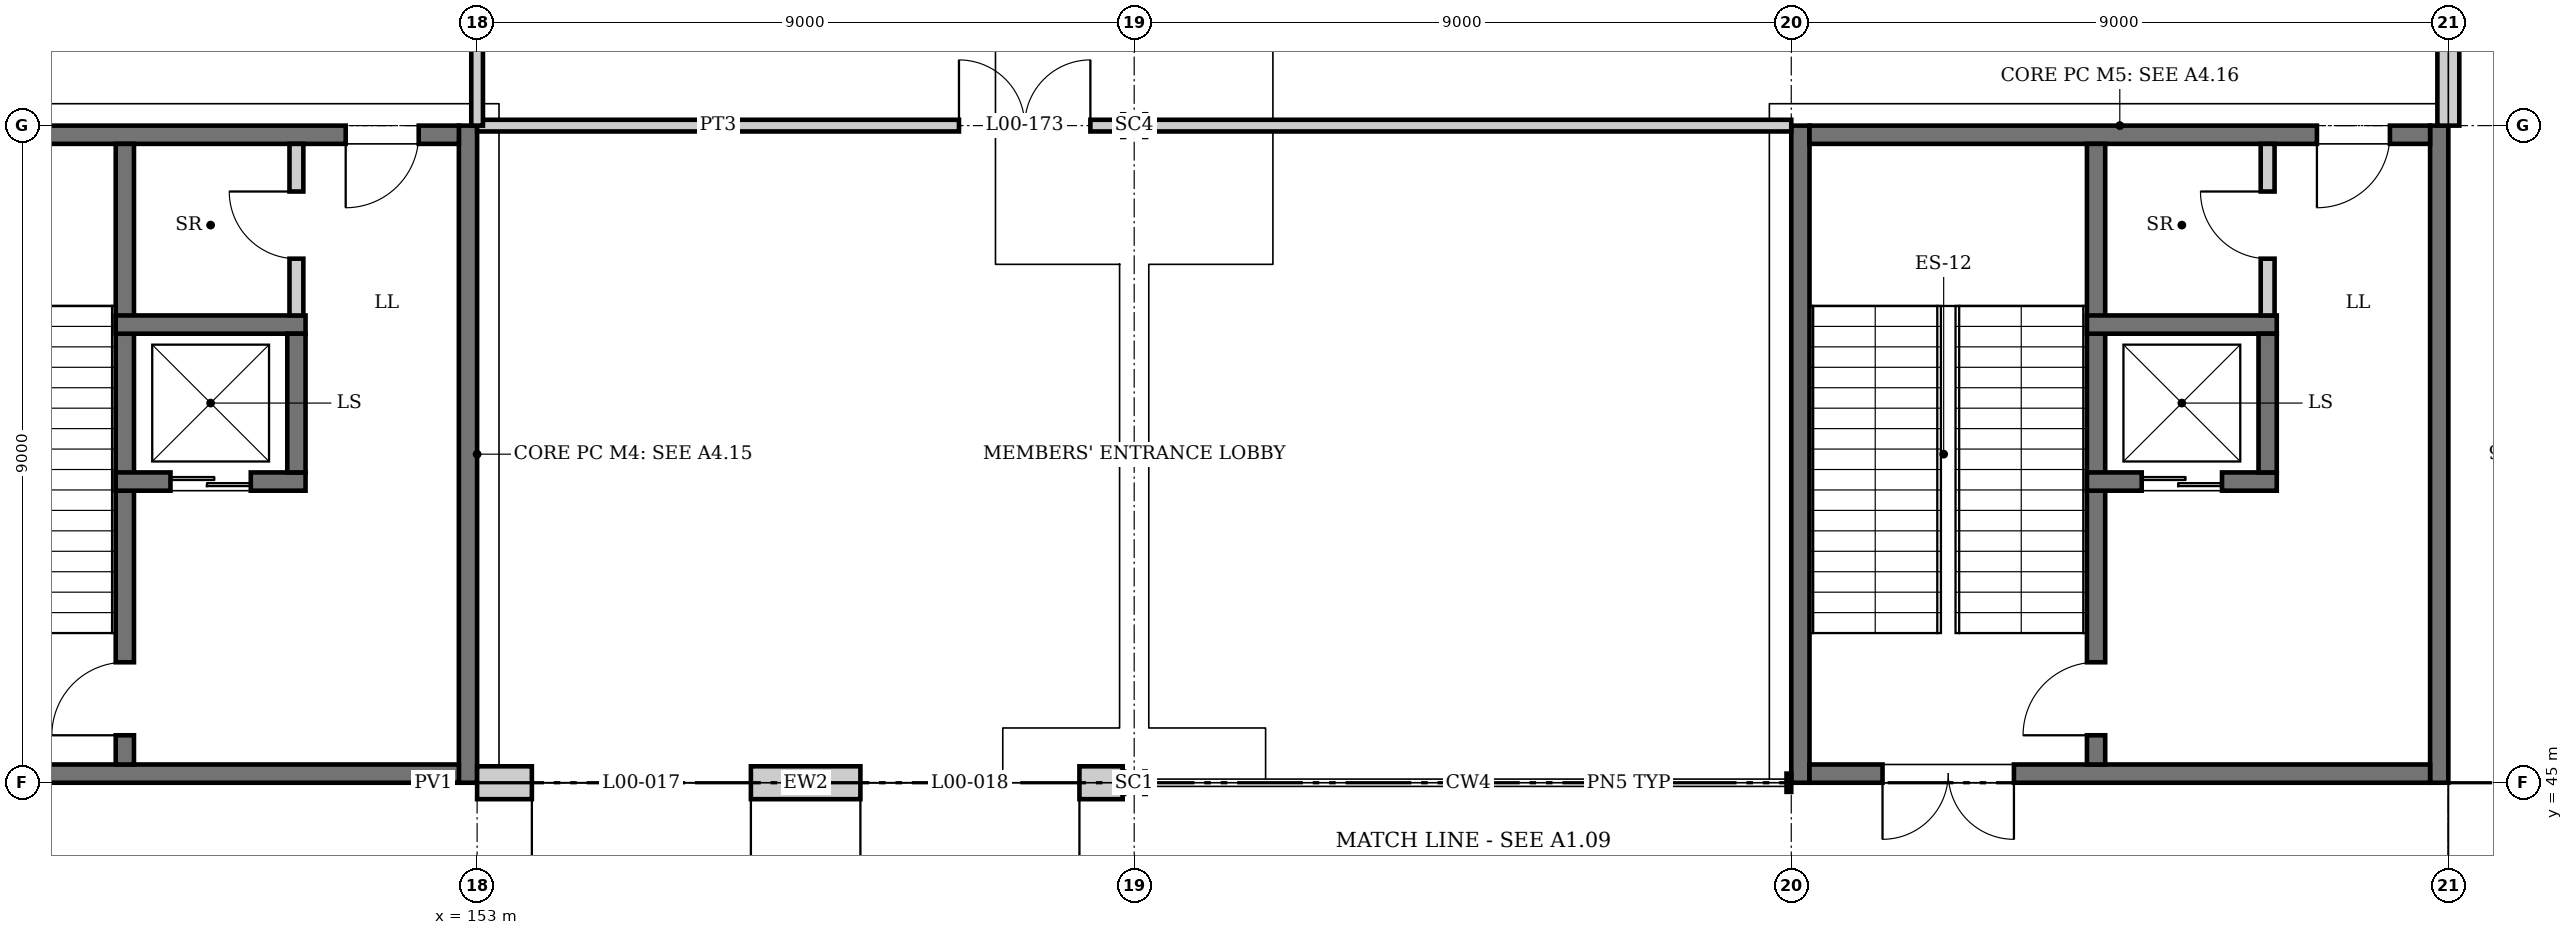
"""IFC4 building model, lengths in metres.
Left out: names, types, materials, properties, quantities, classifications, styles, units other than length and angle.
Written with IfcOpenShell. Run it as: python <this file> out.ifc"""

import sys

from ifc_helpers import new_model, si_unit, direction, frame, frame_2d, origin, origin_2d, place, context, subcontext, project, spatial, rectangle, i_section, extrude, element, fill, save


model = new_model("IFC4")
c1 = context("Model", 3, precision=1e-05, world=origin(), true_north=direction((0.0, 1.0)))
c2 = subcontext(c1, "Body", "Model", "MODEL_VIEW")
j1 = project(units=[si_unit("LENGTHUNIT", "METRE"), si_unit("PLANEANGLEUNIT", "RADIAN")], contexts=[c1])
p1 = place(None, origin())
s1 = spatial("IfcSite", under=j1, at=p1, CompositionType="ELEMENT")
p2 = place(p1, origin())
s2 = spatial("IfcBuilding", under=s1, at=p2, CompositionType="ELEMENT")
p3 = place(p2, origin())
s3 = spatial("IfcBuildingStorey", under=s2, at=p3, CompositionType="ELEMENT", Elevation=0.0)
p4 = place(p3, frame((162.0, 45.0, 0.0), z_axis=(0.0, 0.0, 1.0), x_axis=(0.0, 1.0, 0.0)))
e1 = element("IfcColumn", 1, at=p4, inside=s3, PredefinedType="COLUMN", context=c2, shape_type="SweptSolid", body=[
    extrude(i_section(OverallWidth=0.307, OverallDepth=0.315, WebThickness=0.012, FlangeThickness=0.019, at=origin_2d()), origin(), (0.0, 0.0, 1.0), 6.0),
])
p5 = place(p3, frame((162.0, 54.0, 0.0), z_axis=(0.0, 0.0, 1.0), x_axis=(0.0, 1.0, 0.0)))
e2 = element("IfcColumn", 2, at=p5, inside=s3, PredefinedType="COLUMN", context=c2, shape_type="SweptSolid", body=[
    extrude(i_section(OverallWidth=0.311, OverallDepth=0.327, WebThickness=0.016, FlangeThickness=0.025, at=origin_2d()), origin(), (0.0, 0.0, 1.0), 6.0),
])
p6 = place(p3, frame((152.875, 45.0, 0.0), z_axis=(0.0, 0.0, 1.0), x_axis=(0.0, 1.0, 0.0)))
e3 = element("IfcWall", 3, at=p6, inside=s3, PredefinedType="SHEAR", context=c2, shape_type="SweptSolid", body=[
    extrude(rectangle(XDim=9.0, YDim=0.25, at=frame_2d((4.5, 0.0))), origin(), (0.0, 0.0, 1.0), 6.0),
])
p7 = place(p3, frame((144.25, 45.125, 0.0), z_axis=(0.0, 0.0, 1.0), x_axis=(1.0, 0.0, 0.0)))
e4 = element("IfcWall", 4, at=p7, inside=s3, PredefinedType="SHEAR", context=c2, shape_type="SweptSolid", body=[
    extrude(rectangle(XDim=8.5, YDim=0.25, at=frame_2d((4.25, 0.0))), origin(), (0.0, 0.0, 1.0), 6.0),
])
p8 = place(p7, frame((1.0, 0.0, 0.0)))
e5 = element("IfcOpeningElement", 5, at=p8, cuts=e4, PredefinedType="OPENING", context=c2, shape_type="SweptSolid", body=[
    extrude(rectangle(XDim=1.8, YDim=2.4, at=frame_2d((0.9, 1.2))), frame((0.0, 0.135, 0.0), z_axis=(0.0, -1.0, 0.0), x_axis=(1.0, 0.0, 0.0)), (0.0, 0.0, 1.0), 0.27),
])
p9 = place(p3, frame((144.25, 53.875, 0.0), z_axis=(0.0, 0.0, 1.0), x_axis=(1.0, 0.0, 0.0)))
e6 = element("IfcWall", 6, at=p9, inside=s3, PredefinedType="SHEAR", context=c2, shape_type="SweptSolid", body=[
    extrude(rectangle(XDim=8.5, YDim=0.25, at=frame_2d((4.25, 0.0))), origin(), (0.0, 0.0, 1.0), 6.0),
])
p10 = place(p9, frame((6.95, 0.0, 0.0)))
e7 = element("IfcOpeningElement", 7, at=p10, cuts=e6, PredefinedType="OPENING", context=c2, shape_type="SweptSolid", body=[
    extrude(rectangle(XDim=1.0, YDim=2.1, at=frame_2d((0.5, 1.05))), frame((0.0, 0.135, 0.0), z_axis=(0.0, -1.0, 0.0), x_axis=(1.0, 0.0, 0.0)), (0.0, 0.0, 1.0), 0.27),
])
for number, where, z_axis, x_axis in (
    (8, (171.125, 45.0, 0.0), (0.0, 0.0, 1.0), (0.0, 1.0, 0.0)),
    (9, (179.875, 45.0, 0.0), (0.0, 0.0, 1.0), (0.0, 1.0, 0.0)),
):
    element("IfcWall", number, at=place(p3, frame(where, z_axis=z_axis, x_axis=x_axis)), inside=s3, PredefinedType="SHEAR", context=c2, shape_type="SweptSolid", body=[
        extrude(rectangle(XDim=9.0, YDim=0.25, at=frame_2d((4.5, 0.0))), origin(), (0.0, 0.0, 1.0), 6.0),
    ])
p11 = place(p3, frame((171.25, 45.125, 0.0), z_axis=(0.0, 0.0, 1.0), x_axis=(1.0, 0.0, 0.0)))
e10 = element("IfcWall", 10, at=p11, inside=s3, PredefinedType="SHEAR", context=c2, shape_type="SweptSolid", body=[
    extrude(rectangle(XDim=8.5, YDim=0.25, at=frame_2d((4.25, 0.0))), origin(), (0.0, 0.0, 1.0), 6.0),
])
p12 = place(p11, frame((1.0, 0.0, 0.0)))
e11 = element("IfcOpeningElement", 11, at=p12, cuts=e10, PredefinedType="OPENING", context=c2, shape_type="SweptSolid", body=[
    extrude(rectangle(XDim=1.8, YDim=2.4, at=frame_2d((0.9, 1.2))), frame((0.0, 0.135, 0.0), z_axis=(0.0, -1.0, 0.0), x_axis=(1.0, 0.0, 0.0)), (0.0, 0.0, 1.0), 0.27),
])
p13 = place(p3, frame((171.25, 53.875, 0.0), z_axis=(0.0, 0.0, 1.0), x_axis=(1.0, 0.0, 0.0)))
e12 = element("IfcWall", 12, at=p13, inside=s3, PredefinedType="SHEAR", context=c2, shape_type="SweptSolid", body=[
    extrude(rectangle(XDim=8.5, YDim=0.25, at=frame_2d((4.25, 0.0))), origin(), (0.0, 0.0, 1.0), 6.0),
])
p14 = place(p13, frame((6.95, 0.0, 0.0)))
e13 = element("IfcOpeningElement", 13, at=p14, cuts=e12, PredefinedType="OPENING", context=c2, shape_type="SweptSolid", body=[
    extrude(rectangle(XDim=1.0, YDim=2.1, at=frame_2d((0.5, 1.05))), frame((0.0, 0.135, 0.0), z_axis=(0.0, -1.0, 0.0), x_axis=(1.0, 0.0, 0.0)), (0.0, 0.0, 1.0), 0.27),
])
p15 = place(p3, frame((153.0, 45.0, 0.0), z_axis=(0.0, 0.0, 1.0), x_axis=(1.0, 0.0, 0.0)))
e14 = element("IfcWall", 14, at=p15, inside=s3, PredefinedType="SOLIDWALL", context=c2, shape_type="SweptSolid", body=[
    extrude(rectangle(XDim=8.843, YDim=0.45, at=frame_2d((4.421, 0.0))), origin(), (0.0, 0.0, 1.0), 5.444),
])
p16 = place(p15, frame((0.75, 0.0, 0.0)))
e15 = element("IfcOpeningElement", 15, at=p16, cuts=e14, PredefinedType="OPENING", context=c2, shape_type="SweptSolid", body=[
    extrude(rectangle(XDim=3.0, YDim=3.0, at=frame_2d((1.5, 1.5))), frame((0.0, 0.235, 0.0), z_axis=(0.0, -1.0, 0.0), x_axis=(1.0, 0.0, 0.0)), (0.0, 0.0, 1.0), 0.47),
])
p17 = place(p15, frame((5.25, 0.0, 0.0)))
e16 = element("IfcOpeningElement", 16, at=p17, cuts=e14, PredefinedType="OPENING", context=c2, shape_type="SweptSolid", body=[
    extrude(rectangle(XDim=3.0, YDim=3.0, at=frame_2d((1.5, 1.5))), frame((0.0, 0.235, 0.0), z_axis=(0.0, -1.0, 0.0), x_axis=(1.0, 0.0, 0.0)), (0.0, 0.0, 1.0), 0.47),
])
p18 = place(p3, frame((180.0, 54.0, 0.0), z_axis=(0.0, 0.0, 1.0), x_axis=(0.0, 1.0, 0.0)))
e17 = element("IfcWall", 17, at=p18, inside=s3, PredefinedType="SOLIDWALL", context=c2, shape_type="SweptSolid", body=[
    extrude(rectangle(XDim=8.846, YDim=0.3, at=frame_2d((4.423, 0.0))), origin(), (0.0, 0.0, 1.0), 5.444),
])
p19 = place(p18, frame((1.8, 0.0, 0.6)))
e18 = element("IfcOpeningElement", 18, at=p19, cuts=e17, PredefinedType="OPENING", context=c2, shape_type="SweptSolid", body=[
    extrude(rectangle(XDim=0.9, YDim=2.7, at=frame_2d((0.45, 1.35))), frame((0.0, 0.16, 0.0), z_axis=(0.0, -1.0, 0.0), x_axis=(1.0, 0.0, 0.0)), (0.0, 0.0, 1.0), 0.32),
])
p20 = place(p18, frame((5.7, 0.0, 1.2)))
e19 = element("IfcOpeningElement", 19, at=p20, cuts=e17, PredefinedType="OPENING", context=c2, shape_type="SweptSolid", body=[
    extrude(rectangle(XDim=2.1, YDim=1.2, at=frame_2d((1.05, 0.6))), frame((0.0, 0.16, 0.0), z_axis=(0.0, -1.0, 0.0), x_axis=(1.0, 0.0, 0.0)), (0.0, 0.0, 1.0), 0.32),
])
p21 = place(p3, frame((148.175, 45.25, 0.0), z_axis=(0.0, 0.0, 1.0), x_axis=(0.0, 1.0, 0.0)))
e20 = element("IfcWall", 20, at=p21, inside=s3, PredefinedType="SOLIDWALL", context=c2, shape_type="SweptSolid", body=[
    extrude(rectangle(XDim=8.5, YDim=0.25, at=frame_2d((4.25, 0.0))), origin(), (0.0, 0.0, 1.0), 5.75),
])
p22 = place(p21, frame((0.4, 0.0, 0.0)))
e21 = element("IfcOpeningElement", 21, at=p22, cuts=e20, PredefinedType="OPENING", context=c2, shape_type="SweptSolid", body=[
    extrude(rectangle(XDim=1.0, YDim=2.1, at=frame_2d((0.5, 1.05))), frame((0.0, 0.135, 0.0), z_axis=(0.0, -1.0, 0.0), x_axis=(1.0, 0.0, 0.0)), (0.0, 0.0, 1.0), 0.27),
])
p23 = place(p3, frame((148.05, 49.125, -1.4), z_axis=(0.0, 0.0, 1.0), x_axis=(1.0, 0.0, 0.0)))
e22 = element("IfcWall", 22, at=p23, inside=s3, PredefinedType="SOLIDWALL", context=c2, shape_type="SweptSolid", body=[
    extrude(rectangle(XDim=2.6, YDim=0.25, at=frame_2d((1.3, 0.0))), origin(), (0.0, 0.0, 1.0), 7.4),
])
p24 = place(p23, frame((0.75, 0.0, 1.4)))
e23 = element("IfcOpeningElement", 23, at=p24, cuts=e22, PredefinedType="OPENING", context=c2, shape_type="SweptSolid", body=[
    extrude(rectangle(XDim=1.1, YDim=2.1, at=frame_2d((0.55, 1.05))), frame((0.0, 0.135, 0.0), z_axis=(0.0, -1.0, 0.0), x_axis=(1.0, 0.0, 0.0)), (0.0, 0.0, 1.0), 0.27),
])
p25 = place(p3, frame((148.05, 51.275, -1.4), z_axis=(0.0, 0.0, 1.0), x_axis=(1.0, 0.0, 0.0)))
e24 = element("IfcWall", 24, at=p25, inside=s3, PredefinedType="SOLIDWALL", context=c2, shape_type="SweptSolid", body=[
    extrude(rectangle(XDim=2.6, YDim=0.25, at=frame_2d((1.3, 0.0))), origin(), (0.0, 0.0, 1.0), 7.4),
])
p26 = place(p3, frame((150.525, 49.25, -1.4), z_axis=(0.0, 0.0, 1.0), x_axis=(0.0, 1.0, 0.0)))
e25 = element("IfcWall", 25, at=p26, inside=s3, PredefinedType="SOLIDWALL", context=c2, shape_type="SweptSolid", body=[
    extrude(rectangle(XDim=1.9, YDim=0.25, at=frame_2d((0.95, 0.0))), origin(), (0.0, 0.0, 1.0), 7.4),
])
p27 = place(p3, frame((175.175, 45.25, 0.0), z_axis=(0.0, 0.0, 1.0), x_axis=(0.0, 1.0, 0.0)))
e26 = element("IfcWall", 26, at=p27, inside=s3, PredefinedType="SOLIDWALL", context=c2, shape_type="SweptSolid", body=[
    extrude(rectangle(XDim=8.5, YDim=0.25, at=frame_2d((4.25, 0.0))), origin(), (0.0, 0.0, 1.0), 5.75),
])
p28 = place(p27, frame((0.4, 0.0, 0.0)))
e27 = element("IfcOpeningElement", 27, at=p28, cuts=e26, PredefinedType="OPENING", context=c2, shape_type="SweptSolid", body=[
    extrude(rectangle(XDim=1.0, YDim=2.1, at=frame_2d((0.5, 1.05))), frame((0.0, 0.135, 0.0), z_axis=(0.0, -1.0, 0.0), x_axis=(1.0, 0.0, 0.0)), (0.0, 0.0, 1.0), 0.27),
])
p29 = place(p3, frame((175.05, 49.125, -1.4), z_axis=(0.0, 0.0, 1.0), x_axis=(1.0, 0.0, 0.0)))
e28 = element("IfcWall", 28, at=p29, inside=s3, PredefinedType="SOLIDWALL", context=c2, shape_type="SweptSolid", body=[
    extrude(rectangle(XDim=2.6, YDim=0.25, at=frame_2d((1.3, 0.0))), origin(), (0.0, 0.0, 1.0), 7.4),
])
p30 = place(p29, frame((0.75, 0.0, 1.4)))
e29 = element("IfcOpeningElement", 29, at=p30, cuts=e28, PredefinedType="OPENING", context=c2, shape_type="SweptSolid", body=[
    extrude(rectangle(XDim=1.1, YDim=2.1, at=frame_2d((0.55, 1.05))), frame((0.0, 0.135, 0.0), z_axis=(0.0, -1.0, 0.0), x_axis=(1.0, 0.0, 0.0)), (0.0, 0.0, 1.0), 0.27),
])
p31 = place(p3, frame((175.05, 51.275, -1.4), z_axis=(0.0, 0.0, 1.0), x_axis=(1.0, 0.0, 0.0)))
e30 = element("IfcWall", 30, at=p31, inside=s3, PredefinedType="SOLIDWALL", context=c2, shape_type="SweptSolid", body=[
    extrude(rectangle(XDim=2.6, YDim=0.25, at=frame_2d((1.3, 0.0))), origin(), (0.0, 0.0, 1.0), 7.4),
])
p32 = place(p3, frame((177.525, 49.25, -1.4), z_axis=(0.0, 0.0, 1.0), x_axis=(0.0, 1.0, 0.0)))
e31 = element("IfcWall", 31, at=p32, inside=s3, PredefinedType="SOLIDWALL", context=c2, shape_type="SweptSolid", body=[
    extrude(rectangle(XDim=1.9, YDim=0.25, at=frame_2d((0.95, 0.0))), origin(), (0.0, 0.0, 1.0), 7.4),
])
p33 = place(p3, frame((153.0, 54.0, 0.0), z_axis=(0.0, 0.0, 1.0), x_axis=(1.0, 0.0, 0.0)))
e32 = element("IfcWall", 32, at=p33, inside=s3, PredefinedType="PARTITIONING", context=c2, shape_type="SweptSolid", body=[
    extrude(rectangle(XDim=8.836, YDim=0.16, at=frame_2d((4.418, 0.0))), origin(), (0.0, 0.0, 1.0), 5.322),
])
p34 = place(p33, frame((6.6, 0.0, 0.0)))
e33 = element("IfcOpeningElement", 33, at=p34, cuts=e32, PredefinedType="OPENING", context=c2, shape_type="SweptSolid", body=[
    extrude(rectangle(XDim=1.8, YDim=2.1, at=frame_2d((0.9, 1.05))), frame((0.0, 0.09, 0.0), z_axis=(0.0, -1.0, 0.0), x_axis=(1.0, 0.0, 0.0)), (0.0, 0.0, 1.0), 0.18),
])
p35 = place(p3, frame((162.164, 54.0, 0.0), z_axis=(0.0, 0.0, 1.0), x_axis=(1.0, 0.0, 0.0)))
e34 = element("IfcWall", 34, at=p35, inside=s3, PredefinedType="PARTITIONING", context=c2, shape_type="SweptSolid", body=[
    extrude(rectangle(XDim=8.836, YDim=0.16, at=frame_2d((4.418, 0.0))), origin(), (0.0, 0.0, 1.0), 5.322),
])
p36 = place(p3, frame((150.525, 51.4, 0.0), z_axis=(0.0, 0.0, 1.0), x_axis=(0.0, 1.0, 0.0)))
e35 = element("IfcWall", 35, at=p36, inside=s3, PredefinedType="PARTITIONING", context=c2, shape_type="SweptSolid", body=[
    extrude(rectangle(XDim=2.35, YDim=0.19, at=frame_2d((1.175, 0.0))), origin(), (0.0, 0.0, 1.0), 5.75),
])
p37 = place(p36, frame((0.778, 0.0, 0.0)))
e36 = element("IfcOpeningElement", 36, at=p37, cuts=e35, PredefinedType="OPENING", context=c2, shape_type="SweptSolid", body=[
    extrude(rectangle(XDim=0.92, YDim=2.1, at=frame_2d((0.46, 1.05))), frame((0.0, 0.105, 0.0), z_axis=(0.0, -1.0, 0.0), x_axis=(1.0, 0.0, 0.0)), (0.0, 0.0, 1.0), 0.21),
])
p38 = place(p3, frame((153.0, 54.0, 0.0), z_axis=(0.0, 0.0, 1.0), x_axis=(0.0, 1.0, 0.0)))
e37 = element("IfcWall", 37, at=p38, inside=s3, PredefinedType="PARTITIONING", context=c2, shape_type="SweptSolid", body=[
    extrude(rectangle(XDim=4.4, YDim=0.16, at=frame_2d((2.2, 0.0))), origin(), (0.0, 0.0, 1.0), 5.322),
])
p39 = place(p38, frame((1.35, 0.0, 0.0)))
e38 = element("IfcOpeningElement", 38, at=p39, cuts=e37, PredefinedType="OPENING", context=c2, shape_type="SweptSolid", body=[
    extrude(rectangle(XDim=1.8, YDim=2.1, at=frame_2d((0.9, 1.05))), frame((0.0, 0.09, 0.0), z_axis=(0.0, -1.0, 0.0), x_axis=(1.0, 0.0, 0.0)), (0.0, 0.0, 1.0), 0.18),
])
p40 = place(p3, frame((177.525, 51.4, 0.0), z_axis=(0.0, 0.0, 1.0), x_axis=(0.0, 1.0, 0.0)))
e39 = element("IfcWall", 39, at=p40, inside=s3, PredefinedType="PARTITIONING", context=c2, shape_type="SweptSolid", body=[
    extrude(rectangle(XDim=2.35, YDim=0.19, at=frame_2d((1.175, 0.0))), origin(), (0.0, 0.0, 1.0), 5.75),
])
p41 = place(p40, frame((0.778, 0.0, 0.0)))
e40 = element("IfcOpeningElement", 40, at=p41, cuts=e39, PredefinedType="OPENING", context=c2, shape_type="SweptSolid", body=[
    extrude(rectangle(XDim=0.92, YDim=2.1, at=frame_2d((0.46, 1.05))), frame((0.0, 0.105, 0.0), z_axis=(0.0, -1.0, 0.0), x_axis=(1.0, 0.0, 0.0)), (0.0, 0.0, 1.0), 0.21),
])
p42 = place(p16, frame((3.0, 0.0, 0.0), z_axis=(0.0, 0.0, 1.0), x_axis=(-1.0, 0.0, 0.0)))
e41 = element("IfcDoor", 41, at=p42, inside=s3, OperationType="DOUBLE_DOOR_SINGLE_SWING", PredefinedType="DOOR", context=c2, shape_type="SweptSolid", body=[
    extrude(rectangle(XDim=3.0, YDim=3.0, at=frame_2d((1.5, 1.5))), frame((0.0, 0.025, 0.0), z_axis=(0.0, -1.0, 0.0), x_axis=(1.0, 0.0, 0.0)), (0.0, 0.0, 1.0), 0.05),
])
fill(e15, e41)
p43 = place(p17, frame((3.0, 0.0, 0.0), z_axis=(0.0, 0.0, 1.0), x_axis=(-1.0, 0.0, 0.0)))
e42 = element("IfcDoor", 42, at=p43, inside=s3, OperationType="DOUBLE_DOOR_SINGLE_SWING", PredefinedType="DOOR", context=c2, shape_type="SweptSolid", body=[
    extrude(rectangle(XDim=3.0, YDim=3.0, at=frame_2d((1.5, 1.5))), frame((0.0, 0.025, 0.0), z_axis=(0.0, -1.0, 0.0), x_axis=(1.0, 0.0, 0.0)), (0.0, 0.0, 1.0), 0.05),
])
fill(e16, e42)
p44 = place(p12, frame((1.8, 0.0, 0.0), z_axis=(0.0, 0.0, 1.0), x_axis=(-1.0, 0.0, 0.0)))
e43 = element("IfcDoor", 43, at=p44, inside=s3, OperationType="DOUBLE_DOOR_SINGLE_SWING", PredefinedType="DOOR", context=c2, shape_type="SweptSolid", body=[
    extrude(rectangle(XDim=1.8, YDim=2.4, at=frame_2d((0.9, 1.2))), frame((0.0, 0.025, 0.0), z_axis=(0.0, -1.0, 0.0), x_axis=(1.0, 0.0, 0.0)), (0.0, 0.0, 1.0), 0.05),
])
fill(e11, e43)
p45 = place(p24, origin())
e44 = element("IfcDoor", 44, at=p45, inside=s3, OperationType="DOUBLE_DOOR_SLIDING", PredefinedType="DOOR", context=c2, shape_type="SweptSolid", body=[
    extrude(rectangle(XDim=1.1, YDim=2.1, at=frame_2d((0.55, 1.05))), frame((0.0, 0.025, 0.0), z_axis=(0.0, -1.0, 0.0), x_axis=(1.0, 0.0, 0.0)), (0.0, 0.0, 1.0), 0.05),
])
fill(e23, e44)
p46 = place(p30, origin())
e45 = element("IfcDoor", 45, at=p46, inside=s3, OperationType="DOUBLE_DOOR_SLIDING", PredefinedType="DOOR", context=c2, shape_type="SweptSolid", body=[
    extrude(rectangle(XDim=1.1, YDim=2.1, at=frame_2d((0.55, 1.05))), frame((0.0, 0.025, 0.0), z_axis=(0.0, -1.0, 0.0), x_axis=(1.0, 0.0, 0.0)), (0.0, 0.0, 1.0), 0.05),
])
fill(e29, e45)
p47 = place(p22, origin())
e46 = element("IfcDoor", 46, at=p47, inside=s3, OperationType="SINGLE_SWING_LEFT", PredefinedType="DOOR", context=c2, shape_type="SweptSolid", body=[
    extrude(rectangle(XDim=1.0, YDim=2.1, at=frame_2d((0.5, 1.05))), frame((0.0, 0.025, 0.0), z_axis=(0.0, -1.0, 0.0), x_axis=(1.0, 0.0, 0.0)), (0.0, 0.0, 1.0), 0.05),
])
fill(e21, e46)
p48 = place(p10, frame((1.0, 0.0, 0.0), z_axis=(0.0, 0.0, 1.0), x_axis=(-1.0, 0.0, 0.0)))
e47 = element("IfcDoor", 47, at=p48, inside=s3, OperationType="SINGLE_SWING_RIGHT", PredefinedType="DOOR", context=c2, shape_type="SweptSolid", body=[
    extrude(rectangle(XDim=1.0, YDim=2.1, at=frame_2d((0.5, 1.05))), frame((0.0, 0.025, 0.0), z_axis=(0.0, -1.0, 0.0), x_axis=(1.0, 0.0, 0.0)), (0.0, 0.0, 1.0), 0.05),
])
fill(e7, e47)
p49 = place(p37, origin())
e48 = element("IfcDoor", 48, at=p49, inside=s3, OperationType="SINGLE_SWING_RIGHT", PredefinedType="DOOR", context=c2, shape_type="SweptSolid", body=[
    extrude(rectangle(XDim=0.92, YDim=2.1, at=frame_2d((0.46, 1.05))), frame((0.0, 0.025, 0.0), z_axis=(0.0, -1.0, 0.0), x_axis=(1.0, 0.0, 0.0)), (0.0, 0.0, 1.0), 0.05),
])
fill(e36, e48)
p50 = place(p28, origin())
e49 = element("IfcDoor", 49, at=p50, inside=s3, OperationType="SINGLE_SWING_LEFT", PredefinedType="DOOR", context=c2, shape_type="SweptSolid", body=[
    extrude(rectangle(XDim=1.0, YDim=2.1, at=frame_2d((0.5, 1.05))), frame((0.0, 0.025, 0.0), z_axis=(0.0, -1.0, 0.0), x_axis=(1.0, 0.0, 0.0)), (0.0, 0.0, 1.0), 0.05),
])
fill(e27, e49)
p51 = place(p14, frame((1.0, 0.0, 0.0), z_axis=(0.0, 0.0, 1.0), x_axis=(-1.0, 0.0, 0.0)))
e50 = element("IfcDoor", 50, at=p51, inside=s3, OperationType="SINGLE_SWING_RIGHT", PredefinedType="DOOR", context=c2, shape_type="SweptSolid", body=[
    extrude(rectangle(XDim=1.0, YDim=2.1, at=frame_2d((0.5, 1.05))), frame((0.0, 0.025, 0.0), z_axis=(0.0, -1.0, 0.0), x_axis=(1.0, 0.0, 0.0)), (0.0, 0.0, 1.0), 0.05),
])
fill(e13, e50)
p52 = place(p41, origin())
e51 = element("IfcDoor", 51, at=p52, inside=s3, OperationType="SINGLE_SWING_RIGHT", PredefinedType="DOOR", context=c2, shape_type="SweptSolid", body=[
    extrude(rectangle(XDim=0.92, YDim=2.1, at=frame_2d((0.46, 1.05))), frame((0.0, 0.025, 0.0), z_axis=(0.0, -1.0, 0.0), x_axis=(1.0, 0.0, 0.0)), (0.0, 0.0, 1.0), 0.05),
])
fill(e40, e51)
p53 = place(p34, origin())
e52 = element("IfcDoor", 52, at=p53, inside=s3, OperationType="DOUBLE_DOOR_SINGLE_SWING", PredefinedType="DOOR", context=c2, shape_type="SweptSolid", body=[
    extrude(rectangle(XDim=1.8, YDim=2.1, at=frame_2d((0.9, 1.05))), frame((0.0, 0.025, 0.0), z_axis=(0.0, -1.0, 0.0), x_axis=(1.0, 0.0, 0.0)), (0.0, 0.0, 1.0), 0.05),
])
fill(e33, e52)
save(model, sys.argv[1])
